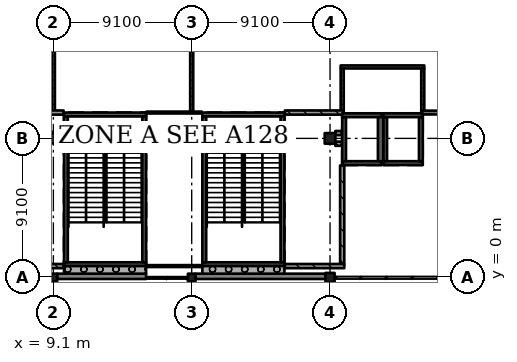
"""IFC4 building model, lengths in metres.
Left out: names, types, materials, properties, quantities, classifications, styles, units other than length and angle.
Written with IfcOpenShell. Run it as: python <this file> out.ifc"""

import sys

from ifc_helpers import new_model, si_unit, direction, frame, frame_2d, origin, origin_2d, place, context, subcontext, project, spatial, rectangle, extrude, element, fill, save


model = new_model("IFC4")
c1 = context("Model", 3, precision=1e-05, world=origin(), true_north=direction((0.0, 1.0)))
c2 = subcontext(c1, "Body", "Model", "MODEL_VIEW")
j1 = project(units=[si_unit("LENGTHUNIT", "METRE"), si_unit("PLANEANGLEUNIT", "RADIAN")], contexts=[c1])
p1 = place(None, origin())
s1 = spatial("IfcSite", under=j1, at=p1, CompositionType="ELEMENT")
p2 = place(p1, origin())
s2 = spatial("IfcBuilding", under=s1, at=p2, CompositionType="ELEMENT")
p3 = place(p2, frame((0.0, 0.0, 10.92)))
s3 = spatial("IfcBuildingStorey", under=s2, at=p3, CompositionType="ELEMENT", Elevation=10.92)
p4 = place(p3, frame((9.1, -0.05, 0.0), z_axis=(0.0, 0.0, 1.0), x_axis=(1.0, 0.0, 0.0)))
e1 = element("IfcColumn", 1, at=p4, inside=s3, PredefinedType="COLUMN", context=c2, shape_type="SweptSolid", body=[
    extrude(rectangle(XDim=0.5, YDim=0.5, at=origin_2d()), origin(), (0.0, 0.0, 1.0), 4.55),
])
p5 = place(p3, frame((9.1, 9.1, 0.0), z_axis=(0.0, 0.0, 1.0), x_axis=(1.0, 0.0, 0.0)))
e2 = element("IfcColumn", 2, at=p5, inside=s3, PredefinedType="COLUMN", context=c2, shape_type="SweptSolid", body=[
    extrude(rectangle(XDim=0.65, YDim=0.65, at=origin_2d()), origin(), (0.0, 0.0, 1.0), 4.55),
])
p6 = place(p3, frame((18.2, -0.05, 0.0), z_axis=(0.0, 0.0, 1.0), x_axis=(1.0, 0.0, 0.0)))
e3 = element("IfcColumn", 3, at=p6, inside=s3, PredefinedType="COLUMN", context=c2, shape_type="SweptSolid", body=[
    extrude(rectangle(XDim=0.5, YDim=0.5, at=origin_2d()), origin(), (0.0, 0.0, 1.0), 4.55),
])
p7 = place(p3, frame((18.2, 9.1, 0.0), z_axis=(0.0, 0.0, 1.0), x_axis=(1.0, 0.0, 0.0)))
e4 = element("IfcColumn", 4, at=p7, inside=s3, PredefinedType="COLUMN", context=c2, shape_type="SweptSolid", body=[
    extrude(rectangle(XDim=0.65, YDim=0.65, at=origin_2d()), origin(), (0.0, 0.0, 1.0), 4.55),
])
p8 = place(p3, frame((27.3, -0.05, 0.0), z_axis=(0.0, 0.0, 1.0), x_axis=(1.0, 0.0, 0.0)))
e5 = element("IfcColumn", 5, at=p8, inside=s3, PredefinedType="COLUMN", context=c2, shape_type="SweptSolid", body=[
    extrude(rectangle(XDim=0.6, YDim=0.6, at=origin_2d()), origin(), (0.0, 0.0, 1.0), 4.55),
])
p9 = place(p3, frame((27.3, 9.1, 0.0), z_axis=(0.0, 0.0, 1.0), x_axis=(1.0, 0.0, 0.0)))
e6 = element("IfcColumn", 6, at=p9, inside=s3, PredefinedType="COLUMN", context=c2, shape_type="SweptSolid", body=[
    extrude(rectangle(XDim=0.7, YDim=0.7, at=origin_2d()), origin(), (0.0, 0.0, 1.0), 4.55),
])
p10 = place(p3, frame((30.7, 7.475, 0.0), z_axis=(0.0, 0.0, 1.0), x_axis=(-1.0, 0.0, 0.0)))
e7 = element("IfcWall", 7, at=p10, inside=s3, PredefinedType="SHEAR", context=c2, shape_type="SweptSolid", body=[
    extrude(rectangle(XDim=2.6, YDim=0.25, at=frame_2d((1.3, 0.0))), origin(), (0.0, 0.0, 1.0), 4.55),
])
p11 = place(p3, frame((30.7, 10.625, 0.0), z_axis=(0.0, 0.0, 1.0), x_axis=(-1.0, 0.0, 0.0)))
e8 = element("IfcWall", 8, at=p11, inside=s3, PredefinedType="SHEAR", context=c2, shape_type="SweptSolid", body=[
    extrude(rectangle(XDim=2.6, YDim=0.25, at=frame_2d((1.3, 0.0))), origin(), (0.0, 0.0, 1.0), 4.55),
])
p12 = place(p11, frame((0.8, 0.0, 0.0)))
e9 = element("IfcOpeningElement", 9, at=p12, cuts=e8, PredefinedType="OPENING", context=c2, shape_type="SweptSolid", body=[
    extrude(rectangle(XDim=1.0, YDim=2.1, at=frame_2d((0.5, 1.05))), frame((0.0, 0.135, 0.0), z_axis=(0.0, -1.0, 0.0), x_axis=(1.0, 0.0, 0.0)), (0.0, 0.0, 1.0), 0.27),
])
p13 = place(p3, frame((28.225, 10.5, 0.0), z_axis=(0.0, 0.0, 1.0), x_axis=(0.0, -1.0, 0.0)))
e10 = element("IfcWall", 10, at=p13, inside=s3, PredefinedType="SHEAR", context=c2, shape_type="SweptSolid", body=[
    extrude(rectangle(XDim=2.9, YDim=0.25, at=frame_2d((1.45, 0.0))), origin(), (0.0, 0.0, 1.0), 4.55),
])
p14 = place(p3, frame((30.625, 10.5, 0.0), z_axis=(0.0, 0.0, 1.0), x_axis=(0.0, -1.0, 0.0)))
e11 = element("IfcWall", 11, at=p14, inside=s3, PredefinedType="SHEAR", context=c2, shape_type="SweptSolid", body=[
    extrude(rectangle(XDim=2.9, YDim=0.35, at=frame_2d((1.45, 0.0))), origin(), (0.0, 0.0, 1.0), 4.55),
])
p15 = place(p3, frame((33.4, 7.475, 0.0), z_axis=(0.0, 0.0, 1.0), x_axis=(-1.0, 0.0, 0.0)))
e12 = element("IfcWall", 12, at=p15, inside=s3, PredefinedType="SHEAR", context=c2, shape_type="SweptSolid", body=[
    extrude(rectangle(XDim=2.6, YDim=0.25, at=frame_2d((1.3, 0.0))), origin(), (0.0, 0.0, 1.0), 4.55),
])
p16 = place(p3, frame((33.4, 10.625, 0.0), z_axis=(0.0, 0.0, 1.0), x_axis=(-1.0, 0.0, 0.0)))
e13 = element("IfcWall", 13, at=p16, inside=s3, PredefinedType="SHEAR", context=c2, shape_type="SweptSolid", body=[
    extrude(rectangle(XDim=2.6, YDim=0.25, at=frame_2d((1.3, 0.0))), origin(), (0.0, 0.0, 1.0), 4.55),
])
p17 = place(p16, frame((0.8, 0.0, 0.0)))
e14 = element("IfcOpeningElement", 14, at=p17, cuts=e13, PredefinedType="OPENING", context=c2, shape_type="SweptSolid", body=[
    extrude(rectangle(XDim=1.0, YDim=2.1, at=frame_2d((0.5, 1.05))), frame((0.0, 0.135, 0.0), z_axis=(0.0, -1.0, 0.0), x_axis=(1.0, 0.0, 0.0)), (0.0, 0.0, 1.0), 0.27),
])
for number, where, z_axis, x_axis in (
    (15, (30.925, 10.5, 0.0), (0.0, 0.0, 1.0), (0.0, -1.0, 0.0)),
    (16, (33.275, 10.5, 0.0), (0.0, 0.0, 1.0), (0.0, -1.0, 0.0)),
):
    element("IfcWall", number, at=place(p3, frame(where, z_axis=z_axis, x_axis=x_axis)), inside=s3, PredefinedType="SHEAR", context=c2, shape_type="SweptSolid", body=[
        extrude(rectangle(XDim=2.9, YDim=0.25, at=frame_2d((1.45, 0.0))), origin(), (0.0, 0.0, 1.0), 4.55),
    ])
p18 = place(p3, frame((15.2, 0.825, 0.0), z_axis=(0.0, 0.0, 1.0), x_axis=(-1.0, 0.0, 0.0)))
e17 = element("IfcWall", 17, at=p18, inside=s3, PredefinedType="SHEAR", context=c2, shape_type="SweptSolid", body=[
    extrude(rectangle(XDim=5.4, YDim=0.25, at=frame_2d((2.7, 0.0))), origin(), (0.0, 0.0, 1.0), 4.55),
])
p19 = place(p3, frame((15.2, 10.675, 0.0), z_axis=(0.0, 0.0, 1.0), x_axis=(-1.0, 0.0, 0.0)))
e18 = element("IfcWall", 18, at=p19, inside=s3, PredefinedType="SHEAR", context=c2, shape_type="SweptSolid", body=[
    extrude(rectangle(XDim=5.4, YDim=0.25, at=frame_2d((2.7, 0.0))), origin(), (0.0, 0.0, 1.0), 4.55),
])
p20 = place(p19, frame((1.5, 0.0, 0.0)))
e19 = element("IfcOpeningElement", 19, at=p20, cuts=e18, PredefinedType="OPENING", context=c2, shape_type="SweptSolid", body=[
    extrude(rectangle(XDim=2.4, YDim=2.1, at=frame_2d((1.2, 1.05))), frame((0.0, 0.135, 0.0), z_axis=(0.0, -1.0, 0.0), x_axis=(1.0, 0.0, 0.0)), (0.0, 0.0, 1.0), 0.27),
])
for number, where, z_axis, x_axis in (
    (20, (9.925, 10.55, 0.0), (0.0, 0.0, 1.0), (0.0, -1.0, 0.0)),
    (21, (15.075, 10.55, 0.0), (0.0, 0.0, 1.0), (0.0, -1.0, 0.0)),
):
    element("IfcWall", number, at=place(p3, frame(where, z_axis=z_axis, x_axis=x_axis)), inside=s3, PredefinedType="SHEAR", context=c2, shape_type="SweptSolid", body=[
        extrude(rectangle(XDim=9.6, YDim=0.25, at=frame_2d((4.8, 0.0))), origin(), (0.0, 0.0, 1.0), 4.55),
    ])
p21 = place(p3, frame((24.3, 0.825, 0.0), z_axis=(0.0, 0.0, 1.0), x_axis=(-1.0, 0.0, 0.0)))
e22 = element("IfcWall", 22, at=p21, inside=s3, PredefinedType="SHEAR", context=c2, shape_type="SweptSolid", body=[
    extrude(rectangle(XDim=5.4, YDim=0.25, at=frame_2d((2.7, 0.0))), origin(), (0.0, 0.0, 1.0), 4.55),
])
p22 = place(p3, frame((24.3, 10.675, 0.0), z_axis=(0.0, 0.0, 1.0), x_axis=(-1.0, 0.0, 0.0)))
e23 = element("IfcWall", 23, at=p22, inside=s3, PredefinedType="SHEAR", context=c2, shape_type="SweptSolid", body=[
    extrude(rectangle(XDim=5.4, YDim=0.25, at=frame_2d((2.7, 0.0))), origin(), (0.0, 0.0, 1.0), 4.55),
])
p23 = place(p22, frame((1.5, 0.0, 0.0)))
e24 = element("IfcOpeningElement", 24, at=p23, cuts=e23, PredefinedType="OPENING", context=c2, shape_type="SweptSolid", body=[
    extrude(rectangle(XDim=2.4, YDim=2.1, at=frame_2d((1.2, 1.05))), frame((0.0, 0.135, 0.0), z_axis=(0.0, -1.0, 0.0), x_axis=(1.0, 0.0, 0.0)), (0.0, 0.0, 1.0), 0.27),
])
for number, where, z_axis, x_axis in (
    (25, (19.025, 10.55, 0.0), (0.0, 0.0, 1.0), (0.0, -1.0, 0.0)),
    (26, (24.175, 10.55, 0.0), (0.0, 0.0, 1.0), (0.0, -1.0, 0.0)),
):
    element("IfcWall", number, at=place(p3, frame(where, z_axis=z_axis, x_axis=x_axis)), inside=s3, PredefinedType="SHEAR", context=c2, shape_type="SweptSolid", body=[
        extrude(rectangle(XDim=9.6, YDim=0.25, at=frame_2d((4.8, 0.0))), origin(), (0.0, 0.0, 1.0), 4.55),
    ])
p24 = place(p3, frame((9.35, 0.025, 0.0), z_axis=(0.0, 0.0, 1.0), x_axis=(1.0, 0.0, 0.0)))
e27 = element("IfcWall", 27, at=p24, inside=s3, PredefinedType="SOLIDWALL", context=c2, shape_type="SweptSolid", body=[
    extrude(rectangle(XDim=5.85, YDim=0.35, at=frame_2d((2.925, 0.0))), origin(), (0.0, 0.0, 1.0), 3.5),
])
p25 = place(p3, frame((18.45, 0.025, 0.0), z_axis=(0.0, 0.0, 1.0), x_axis=(1.0, 0.0, 0.0)))
e28 = element("IfcWall", 28, at=p25, inside=s3, PredefinedType="SOLIDWALL", context=c2, shape_type="SweptSolid", body=[
    extrude(rectangle(XDim=8.55, YDim=0.35, at=frame_2d((4.275, 0.0))), origin(), (0.0, 0.0, 1.0), 3.5),
])
p26 = place(p3, frame((9.8, 0.45, 0.0), z_axis=(0.0, 0.0, 1.0), x_axis=(1.0, 0.0, 0.0)))
e29 = element("IfcWall", 29, at=p26, inside=s3, PredefinedType="SOLIDWALL", context=c2, shape_type="SweptSolid", body=[
    extrude(rectangle(XDim=5.4, YDim=0.5, at=frame_2d((2.7, 0.0))), origin(), (0.0, 0.0, 1.0), 4.55),
])
p27 = place(p3, frame((18.9, 0.45, 0.0), z_axis=(0.0, 0.0, 1.0), x_axis=(1.0, 0.0, 0.0)))
e30 = element("IfcWall", 30, at=p27, inside=s3, PredefinedType="SOLIDWALL", context=c2, shape_type="SweptSolid", body=[
    extrude(rectangle(XDim=5.4, YDim=0.5, at=frame_2d((2.7, 0.0))), origin(), (0.0, 0.0, 1.0), 4.55),
])
p28 = place(p3, frame((9.1, 9.425, 0.0), z_axis=(0.0, 0.0, 1.0), x_axis=(1.0, 0.0, 0.0)))
e31 = element("IfcWall", 31, at=p28, inside=s3, PredefinedType="SOLIDWALL", context=c2, shape_type="SweptSolid", body=[
    extrude(rectangle(XDim=0.67, YDim=0.275, at=frame_2d((0.335, 0.0))), origin(), (0.0, 0.0, 1.0), 4.25),
])
p29 = place(p3, frame((6.13, 10.8, 0.0), z_axis=(0.0, 0.0, 1.0), x_axis=(1.0, 0.0, 0.0)))
e32 = element("IfcWall", 32, at=p29, inside=s3, PredefinedType="SOLIDWALL", context=c2, shape_type="SweptSolid", body=[
    extrude(rectangle(XDim=3.64, YDim=0.275, at=frame_2d((1.82, 0.0))), origin(), (0.0, 0.0, 1.0), 4.25),
])
p30 = place(p29, frame((0.92, 0.0, 0.0)))
e33 = element("IfcOpeningElement", 33, at=p30, cuts=e32, PredefinedType="OPENING", context=c2, shape_type="SweptSolid", body=[
    extrude(rectangle(XDim=1.2, YDim=2.4, at=frame_2d((0.6, 1.2))), frame((0.0, 0.147, 0.0), z_axis=(0.0, -1.0, 0.0), x_axis=(1.0, 0.0, 0.0)), (0.0, 0.0, 1.0), 0.295),
])
p31 = place(p3, frame((9.1, 17.8, 0.0), z_axis=(0.0, 0.0, 1.0), x_axis=(0.0, -1.0, 0.0)))
e34 = element("IfcWall", 34, at=p31, inside=s3, PredefinedType="PARTITIONING", context=c2, shape_type="SweptSolid", body=[
    extrude(rectangle(XDim=6.863, YDim=0.2, at=frame_2d((3.431, 0.0))), origin(), (0.0, 0.0, 1.0), 3.55),
])
p32 = place(p31, frame((0.85, 0.0, 0.0)))
e35 = element("IfcOpeningElement", 35, at=p32, cuts=e34, PredefinedType="OPENING", context=c2, shape_type="SweptSolid", body=[
    extrude(rectangle(XDim=1.8, YDim=2.4, at=frame_2d((0.9, 1.2))), frame((0.0, 0.11, 0.0), z_axis=(0.0, -1.0, 0.0), x_axis=(1.0, 0.0, 0.0)), (0.0, 0.0, 1.0), 0.22),
])
p33 = place(p31, frame((4.25, 0.0, 0.0)))
e36 = element("IfcOpeningElement", 36, at=p33, cuts=e34, PredefinedType="OPENING", context=c2, shape_type="SweptSolid", body=[
    extrude(rectangle(XDim=1.8, YDim=2.4, at=frame_2d((0.9, 1.2))), frame((0.0, 0.11, 0.0), z_axis=(0.0, -1.0, 0.0), x_axis=(1.0, 0.0, 0.0)), (0.0, 0.0, 1.0), 0.22),
])
p34 = place(p3, frame((9.425, 8.775, 0.0), z_axis=(0.0, 0.0, 1.0), x_axis=(1.0, 0.0, 0.0)))
e37 = element("IfcWall", 37, at=p34, inside=s3, PredefinedType="SOLIDWALL", context=c2, shape_type="SweptSolid", body=[
    extrude(rectangle(XDim=0.345, YDim=0.275, at=frame_2d((0.172, 0.0))), origin(), (0.0, 0.0, 1.0), 4.25),
])
p35 = place(p3, frame((9.77, 0.7, 0.0), z_axis=(0.0, 0.0, 1.0), x_axis=(-1.0, 0.0, 0.0)))
e38 = element("IfcWall", 38, at=p35, inside=s3, PredefinedType="SOLIDWALL", context=c2, shape_type="SweptSolid", body=[
    extrude(rectangle(XDim=3.64, YDim=0.275, at=frame_2d((1.82, 0.0))), origin(), (0.0, 0.0, 1.0), 4.25),
])
p36 = place(p3, frame((18.2, 9.425, 0.0), z_axis=(0.0, 0.0, 1.0), x_axis=(1.0, 0.0, 0.0)))
e39 = element("IfcWall", 39, at=p36, inside=s3, PredefinedType="PARTITIONING", context=c2, shape_type="SweptSolid", body=[
    extrude(rectangle(XDim=0.67, YDim=0.125, at=frame_2d((0.335, 0.0))), origin(), (0.0, 0.0, 1.0), 4.25),
])
p37 = place(p3, frame((15.23, 10.8, 0.0), z_axis=(0.0, 0.0, 1.0), x_axis=(1.0, 0.0, 0.0)))
e40 = element("IfcWall", 40, at=p37, inside=s3, PredefinedType="PARTITIONING", context=c2, shape_type="SweptSolid", body=[
    extrude(rectangle(XDim=3.64, YDim=0.125, at=frame_2d((1.82, 0.0))), origin(), (0.0, 0.0, 1.0), 4.25),
])
p38 = place(p37, frame((1.02, 0.0, 0.0)))
e41 = element("IfcOpeningElement", 41, at=p38, cuts=e40, PredefinedType="OPENING", context=c2, shape_type="SweptSolid", body=[
    extrude(rectangle(XDim=0.9, YDim=2.1, at=frame_2d((0.45, 1.05))), frame((0.0, 0.073, 0.0), z_axis=(0.0, -1.0, 0.0), x_axis=(1.0, 0.0, 0.0)), (0.0, 0.0, 1.0), 0.145),
])
p39 = place(p3, frame((18.2, 17.8, 0.0), z_axis=(0.0, 0.0, 1.0), x_axis=(0.0, -1.0, 0.0)))
e42 = element("IfcWall", 42, at=p39, inside=s3, PredefinedType="PARTITIONING", context=c2, shape_type="SweptSolid", body=[
    extrude(rectangle(XDim=6.938, YDim=0.2, at=frame_2d((3.469, 0.0))), origin(), (0.0, 0.0, 1.0), 3.55),
])
p40 = place(p39, frame((0.85, 0.0, 0.0)))
e43 = element("IfcOpeningElement", 43, at=p40, cuts=e42, PredefinedType="OPENING", context=c2, shape_type="SweptSolid", body=[
    extrude(rectangle(XDim=1.8, YDim=2.4, at=frame_2d((0.9, 1.2))), frame((0.0, 0.11, 0.0), z_axis=(0.0, -1.0, 0.0), x_axis=(1.0, 0.0, 0.0)), (0.0, 0.0, 1.0), 0.22),
])
p41 = place(p39, frame((4.35, 0.0, 0.0)))
e44 = element("IfcOpeningElement", 44, at=p41, cuts=e42, PredefinedType="OPENING", context=c2, shape_type="SweptSolid", body=[
    extrude(rectangle(XDim=1.8, YDim=2.4, at=frame_2d((0.9, 1.2))), frame((0.0, 0.11, 0.0), z_axis=(0.0, -1.0, 0.0), x_axis=(1.0, 0.0, 0.0)), (0.0, 0.0, 1.0), 0.22),
])
p42 = place(p3, frame((18.525, 8.775, 0.0), z_axis=(0.0, 0.0, 1.0), x_axis=(1.0, 0.0, 0.0)))
e45 = element("IfcWall", 45, at=p42, inside=s3, PredefinedType="PARTITIONING", context=c2, shape_type="SweptSolid", body=[
    extrude(rectangle(XDim=0.345, YDim=0.125, at=frame_2d((0.173, 0.0))), origin(), (0.0, 0.0, 1.0), 4.25),
])
p43 = place(p3, frame((18.87, 0.7, 0.0), z_axis=(0.0, 0.0, 1.0), x_axis=(-1.0, 0.0, 0.0)))
e46 = element("IfcWall", 46, at=p43, inside=s3, PredefinedType="PARTITIONING", context=c2, shape_type="SweptSolid", body=[
    extrude(rectangle(XDim=3.64, YDim=0.125, at=frame_2d((1.82, 0.0))), origin(), (0.0, 0.0, 1.0), 4.25),
])
for number, where, z_axis, x_axis in (
    (47, (27.65, 8.75, 0.0), (0.0, 0.0, 1.0), (1.0, 0.0, 0.0)),
    (48, (28.07, 9.45, 0.0), (0.0, 0.0, 1.0), (-1.0, 0.0, 0.0)),
):
    element("IfcWall", number, at=place(p3, frame(where, z_axis=z_axis, x_axis=x_axis)), inside=s3, PredefinedType="SOLIDWALL", context=c2, shape_type="SweptSolid", body=[
        extrude(rectangle(XDim=0.42, YDim=0.275, at=frame_2d((0.21, 0.0))), origin(), (0.0, 0.0, 1.0), 4.25),
    ])
p44 = place(p3, frame((28.1, 7.32, 0.0), z_axis=(0.0, 0.0, 1.0), x_axis=(0.0, -1.0, 0.0)))
e49 = element("IfcWall", 49, at=p44, inside=s3, PredefinedType="SOLIDWALL", context=c2, shape_type="SweptSolid", body=[
    extrude(rectangle(XDim=6.483, YDim=0.275, at=frame_2d((3.241, 0.0))), origin(), (0.0, 0.0, 1.0), 4.25),
])
p45 = place(p3, frame((28.1, 13.7, 0.0), z_axis=(0.0, 0.0, 1.0), x_axis=(0.0, -1.0, 0.0)))
e50 = element("IfcWall", 50, at=p45, inside=s3, PredefinedType="PARTITIONING", context=c2, shape_type="SweptSolid", body=[
    extrude(rectangle(XDim=2.762, YDim=0.2, at=frame_2d((1.381, 0.0))), origin(), (0.0, 0.0, 1.0), 4.25),
])
p46 = place(p45, frame((0.45, 0.0, 0.0)))
e51 = element("IfcOpeningElement", 51, at=p46, cuts=e50, PredefinedType="OPENING", context=c2, shape_type="SweptSolid", body=[
    extrude(rectangle(XDim=1.8, YDim=2.4, at=frame_2d((0.9, 1.2))), frame((0.0, 0.11, 0.0), z_axis=(0.0, -1.0, 0.0), x_axis=(1.0, 0.0, 0.0)), (0.0, 0.0, 1.0), 0.22),
])
p47 = place(p3, frame((28.2, 10.8, 0.0), z_axis=(0.0, 0.0, 1.0), x_axis=(-1.0, 0.0, 0.0)))
e52 = element("IfcWall", 52, at=p47, inside=s3, PredefinedType="SOLIDWALL", context=c2, shape_type="SweptSolid", body=[
    extrude(rectangle(XDim=3.87, YDim=0.275, at=frame_2d((1.935, 0.0))), origin(), (0.0, 0.0, 1.0), 4.25),
])
p48 = place(p47, frame((1.35, 0.0, 0.0)))
e53 = element("IfcOpeningElement", 53, at=p48, cuts=e52, PredefinedType="OPENING", context=c2, shape_type="SweptSolid", body=[
    extrude(rectangle(XDim=1.2, YDim=2.4, at=frame_2d((0.6, 1.2))), frame((0.0, 0.147, 0.0), z_axis=(0.0, -1.0, 0.0), x_axis=(1.0, 0.0, 0.0)), (0.0, 0.0, 1.0), 0.295),
])
p49 = place(p3, frame((28.238, 0.7, 0.0), z_axis=(0.0, 0.0, 1.0), x_axis=(-1.0, 0.0, 0.0)))
e54 = element("IfcWall", 54, at=p49, inside=s3, PredefinedType="SOLIDWALL", context=c2, shape_type="SweptSolid", body=[
    extrude(rectangle(XDim=3.907, YDim=0.275, at=frame_2d((1.954, 0.0))), origin(), (0.0, 0.0, 1.0), 4.25),
])
p50 = place(p3, frame((33.4, 10.925, 0.0), z_axis=(0.0, 0.0, 1.0), x_axis=(0.0, 1.0, 0.0)))
e55 = element("IfcWall", 55, at=p50, inside=s3, PredefinedType="PARTITIONING", context=c2, shape_type="SweptSolid", body=[
    extrude(rectangle(XDim=2.775, YDim=0.2, at=frame_2d((1.387, 0.0))), origin(), (0.0, 0.0, 1.0), 4.25),
])
p51 = place(p50, frame((0.45, 0.0, 0.0)))
e56 = element("IfcOpeningElement", 56, at=p51, cuts=e55, PredefinedType="OPENING", context=c2, shape_type="SweptSolid", body=[
    extrude(rectangle(XDim=1.8, YDim=2.4, at=frame_2d((0.9, 1.2))), frame((0.0, 0.11, 0.0), z_axis=(0.0, -1.0, 0.0), x_axis=(1.0, 0.0, 0.0)), (0.0, 0.0, 1.0), 0.22),
])
p52 = place(p3, frame((33.5, 13.8, 0.0), z_axis=(0.0, 0.0, 1.0), x_axis=(-1.0, 0.0, 0.0)))
e57 = element("IfcWall", 57, at=p52, inside=s3, PredefinedType="PARTITIONING", context=c2, shape_type="SweptSolid", body=[
    extrude(rectangle(XDim=5.5, YDim=0.2, at=frame_2d((2.75, 0.0))), origin(), (0.0, 0.0, 1.0), 4.25),
])
p53 = place(p52, frame((1.85, 0.0, 0.0)))
e58 = element("IfcOpeningElement", 58, at=p53, cuts=e57, PredefinedType="OPENING", context=c2, shape_type="SweptSolid", body=[
    extrude(rectangle(XDim=1.8, YDim=2.4, at=frame_2d((0.9, 1.2))), frame((0.0, 0.11, 0.0), z_axis=(0.0, -1.0, 0.0), x_axis=(1.0, 0.0, 0.0)), (0.0, 0.0, 1.0), 0.22),
])
p54 = place(p3, frame((36.125, 10.8, 0.0), z_axis=(0.0, 0.0, 1.0), x_axis=(-1.0, 0.0, 0.0)))
e59 = element("IfcWall", 59, at=p54, inside=s3, PredefinedType="SOLIDWALL", context=c2, shape_type="SweptSolid", body=[
    extrude(rectangle(XDim=2.825, YDim=0.25, at=frame_2d((1.413, 0.0))), origin(), (0.0, 0.0, 1.0), 4.25),
])
p55 = place(p38, origin())
e60 = element("IfcDoor", 60, at=p55, inside=s3, OperationType="SINGLE_SWING_LEFT", PredefinedType="DOOR", context=c2, shape_type="SweptSolid", body=[
    extrude(rectangle(XDim=0.9, YDim=2.1, at=frame_2d((0.45, 1.05))), frame((0.0, 0.025, 0.0), z_axis=(0.0, -1.0, 0.0), x_axis=(1.0, 0.0, 0.0)), (0.0, 0.0, 1.0), 0.05),
])
fill(e41, e60)
p56 = place(p48, origin())
e61 = element("IfcDoor", 61, at=p56, inside=s3, OperationType="SINGLE_SWING_LEFT", PredefinedType="DOOR", context=c2, shape_type="SweptSolid", body=[
    extrude(rectangle(XDim=1.2, YDim=2.4, at=frame_2d((0.6, 1.2))), frame((0.0, 0.025, 0.0), z_axis=(0.0, -1.0, 0.0), x_axis=(1.0, 0.0, 0.0)), (0.0, 0.0, 1.0), 0.05),
])
fill(e53, e61)
p57 = place(p33, origin())
e62 = element("IfcDoor", 62, at=p57, inside=s3, OperationType="DOUBLE_DOOR_SINGLE_SWING", PredefinedType="DOOR", context=c2, shape_type="SweptSolid", body=[
    extrude(rectangle(XDim=1.8, YDim=2.4, at=frame_2d((0.9, 1.2))), frame((0.0, 0.025, 0.0), z_axis=(0.0, -1.0, 0.0), x_axis=(1.0, 0.0, 0.0)), (0.0, 0.0, 1.0), 0.05),
])
fill(e36, e62)
p58 = place(p41, origin())
e63 = element("IfcDoor", 63, at=p58, inside=s3, OperationType="DOUBLE_DOOR_SINGLE_SWING", PredefinedType="DOOR", context=c2, shape_type="SweptSolid", body=[
    extrude(rectangle(XDim=1.8, YDim=2.4, at=frame_2d((0.9, 1.2))), frame((0.0, 0.025, 0.0), z_axis=(0.0, -1.0, 0.0), x_axis=(1.0, 0.0, 0.0)), (0.0, 0.0, 1.0), 0.05),
])
fill(e44, e63)
p59 = place(p53, origin())
e64 = element("IfcDoor", 64, at=p59, inside=s3, OperationType="DOUBLE_DOOR_SINGLE_SWING", PredefinedType="DOOR", context=c2, shape_type="SweptSolid", body=[
    extrude(rectangle(XDim=1.8, YDim=2.4, at=frame_2d((0.9, 1.2))), frame((0.0, 0.025, 0.0), z_axis=(0.0, -1.0, 0.0), x_axis=(1.0, 0.0, 0.0)), (0.0, 0.0, 1.0), 0.05),
])
fill(e58, e64)
p60 = place(p51, origin())
e65 = element("IfcDoor", 65, at=p60, inside=s3, OperationType="DOUBLE_DOOR_SINGLE_SWING", PredefinedType="DOOR", context=c2, shape_type="SweptSolid", body=[
    extrude(rectangle(XDim=1.8, YDim=2.4, at=frame_2d((0.9, 1.2))), frame((0.0, 0.025, 0.0), z_axis=(0.0, -1.0, 0.0), x_axis=(1.0, 0.0, 0.0)), (0.0, 0.0, 1.0), 0.05),
])
fill(e56, e65)
p61 = place(p46, origin())
e66 = element("IfcDoor", 66, at=p61, inside=s3, OperationType="DOUBLE_DOOR_SINGLE_SWING", PredefinedType="DOOR", context=c2, shape_type="SweptSolid", body=[
    extrude(rectangle(XDim=1.8, YDim=2.4, at=frame_2d((0.9, 1.2))), frame((0.0, 0.025, 0.0), z_axis=(0.0, -1.0, 0.0), x_axis=(1.0, 0.0, 0.0)), (0.0, 0.0, 1.0), 0.05),
])
fill(e51, e66)
p62 = place(p20, origin())
e67 = element("IfcDoor", 67, at=p62, inside=s3, OperationType="DOUBLE_DOOR_SINGLE_SWING", PredefinedType="DOOR", context=c2, shape_type="SweptSolid", body=[
    extrude(rectangle(XDim=2.4, YDim=2.1, at=frame_2d((1.2, 1.05))), frame((0.0, 0.025, 0.0), z_axis=(0.0, -1.0, 0.0), x_axis=(1.0, 0.0, 0.0)), (0.0, 0.0, 1.0), 0.05),
])
fill(e19, e67)
p63 = place(p23, origin())
e68 = element("IfcDoor", 68, at=p63, inside=s3, OperationType="DOUBLE_DOOR_SINGLE_SWING", PredefinedType="DOOR", context=c2, shape_type="SweptSolid", body=[
    extrude(rectangle(XDim=2.4, YDim=2.1, at=frame_2d((1.2, 1.05))), frame((0.0, 0.025, 0.0), z_axis=(0.0, -1.0, 0.0), x_axis=(1.0, 0.0, 0.0)), (0.0, 0.0, 1.0), 0.05),
])
fill(e24, e68)
p64 = place(p12, origin())
e69 = element("IfcDoor", 69, at=p64, inside=s3, OperationType="DOUBLE_DOOR_SLIDING", PredefinedType="DOOR", context=c2, shape_type="SweptSolid", body=[
    extrude(rectangle(XDim=1.0, YDim=2.1, at=frame_2d((0.5, 1.05))), frame((0.0, 0.025, 0.0), z_axis=(0.0, -1.0, 0.0), x_axis=(1.0, 0.0, 0.0)), (0.0, 0.0, 1.0), 0.05),
])
fill(e9, e69)
p65 = place(p17, origin())
e70 = element("IfcDoor", 70, at=p65, inside=s3, OperationType="DOUBLE_DOOR_SLIDING", PredefinedType="DOOR", context=c2, shape_type="SweptSolid", body=[
    extrude(rectangle(XDim=1.0, YDim=2.1, at=frame_2d((0.5, 1.05))), frame((0.0, 0.025, 0.0), z_axis=(0.0, -1.0, 0.0), x_axis=(1.0, 0.0, 0.0)), (0.0, 0.0, 1.0), 0.05),
])
fill(e14, e70)
save(model, sys.argv[1])
